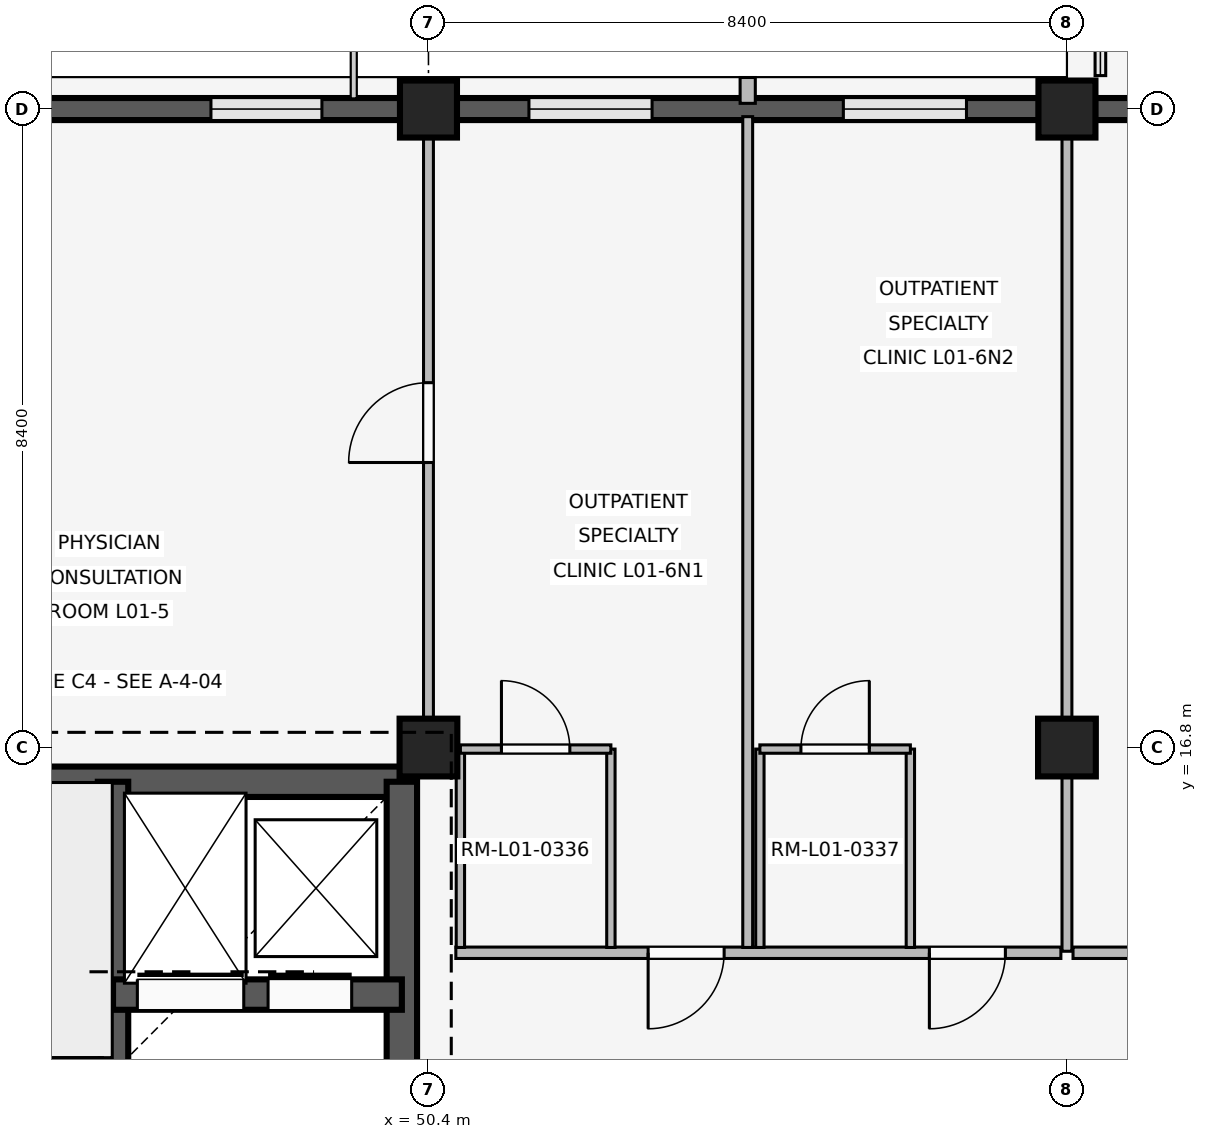
"""IFC4 building model, lengths in metres.
Left out: names, types, materials, properties, quantities, classifications, styles, units other than length and angle.
Written with IfcOpenShell. Run it as: python <this file> out.ifc"""

import sys

from ifc_helpers import new_model, si_unit, direction, frame, frame_2d, origin, origin_2d, place, context, subcontext, project, spatial, rectangle, extrude, element, fill, save


model = new_model("IFC4")
c1 = context("Model", 3, precision=1e-05, world=origin(), true_north=direction((0.0, 1.0)))
c2 = subcontext(c1, "Body", "Model", "MODEL_VIEW")
j1 = project(units=[si_unit("LENGTHUNIT", "METRE"), si_unit("PLANEANGLEUNIT", "RADIAN")], contexts=[c1])
p1 = place(None, origin())
s1 = spatial("IfcSite", under=j1, at=p1, CompositionType="ELEMENT")
p2 = place(p1, origin())
s2 = spatial("IfcBuilding", under=s1, at=p2, CompositionType="ELEMENT")
p3 = place(p2, frame((0.0, 0.0, 4.8)))
s3 = spatial("IfcBuildingStorey", under=s2, at=p3, CompositionType="ELEMENT", Elevation=4.8)
p4 = place(p3, frame((50.4, 16.8, 0.0), z_axis=(0.0, 0.0, 1.0), x_axis=(1.0, 0.0, 0.0)))
e1 = element("IfcColumn", 1, at=p4, inside=s3, PredefinedType="COLUMN", context=c2, shape_type="SweptSolid", body=[
    extrude(rectangle(XDim=0.76, YDim=0.76, at=origin_2d()), origin(), (0.0, 0.0, 1.0), 3.3),
])
p5 = place(p3, frame((50.4, 25.2, 0.0), z_axis=(0.0, 0.0, 1.0), x_axis=(1.0, 0.0, 0.0)))
e2 = element("IfcColumn", 2, at=p5, inside=s3, PredefinedType="COLUMN", context=c2, shape_type="SweptSolid", body=[
    extrude(rectangle(XDim=0.75, YDim=0.75, at=origin_2d()), origin(), (0.0, 0.0, 1.0), 3.3),
])
p6 = place(p3, frame((58.8, 16.8, 0.0), z_axis=(0.0, 0.0, 1.0), x_axis=(1.0, 0.0, 0.0)))
e3 = element("IfcColumn", 3, at=p6, inside=s3, PredefinedType="COLUMN", context=c2, shape_type="SweptSolid", body=[
    extrude(rectangle(XDim=0.76, YDim=0.76, at=origin_2d()), origin(), (0.0, 0.0, 1.0), 3.3),
])
p7 = place(p3, frame((58.8, 25.2, 0.0), z_axis=(0.0, 0.0, 1.0), x_axis=(1.0, 0.0, 0.0)))
e4 = element("IfcColumn", 4, at=p7, inside=s3, PredefinedType="COLUMN", context=c2, shape_type="SweptSolid", body=[
    extrude(rectangle(XDim=0.75, YDim=0.75, at=origin_2d()), origin(), (0.0, 0.0, 1.0), 3.3),
])
p8 = place(p3, frame((42.37, 25.2, 0.0), z_axis=(0.0, 0.0, 1.0), x_axis=(1.0, 0.0, 0.0)))
e5 = element("IfcWall", 5, at=p8, inside=s3, PredefinedType="SOLIDWALL", context=c2, shape_type="SweptSolid", body=[
    extrude(rectangle(XDim=7.66, YDim=0.29, at=frame_2d((3.83, 0.0))), origin(), (0.0, 0.0, 1.0), 2.42),
])
p9 = place(p8, frame((1.032, 0.0, 0.85)))
e6 = element("IfcOpeningElement", 6, at=p9, cuts=e5, PredefinedType="OPENING", context=c2, shape_type="SweptSolid", body=[
    extrude(rectangle(XDim=1.46, YDim=0.85, at=frame_2d((0.73, 0.425))), frame((0.0, 0.155, 0.0), z_axis=(0.0, -1.0, 0.0), x_axis=(1.0, 0.0, 0.0)), (0.0, 0.0, 1.0), 0.31),
])
p10 = place(p8, frame((5.168, 0.0, 0.85)))
e7 = element("IfcOpeningElement", 7, at=p10, cuts=e5, PredefinedType="OPENING", context=c2, shape_type="SweptSolid", body=[
    extrude(rectangle(XDim=1.46, YDim=0.85, at=frame_2d((0.73, 0.425))), frame((0.0, 0.155, 0.0), z_axis=(0.0, -1.0, 0.0), x_axis=(1.0, 0.0, 0.0)), (0.0, 0.0, 1.0), 0.31),
])
p11 = place(p3, frame((50.77, 25.2, 0.0), z_axis=(0.0, 0.0, 1.0), x_axis=(1.0, 0.0, 0.0)))
e8 = element("IfcWall", 8, at=p11, inside=s3, PredefinedType="SOLIDWALL", context=c2, shape_type="SweptSolid", body=[
    extrude(rectangle(XDim=7.66, YDim=0.29, at=frame_2d((3.83, 0.0))), origin(), (0.0, 0.0, 1.0), 2.42),
])
p12 = place(p11, frame((0.952, 0.0, 0.85)))
e9 = element("IfcOpeningElement", 9, at=p12, cuts=e8, PredefinedType="OPENING", context=c2, shape_type="SweptSolid", body=[
    extrude(rectangle(XDim=1.62, YDim=0.95, at=frame_2d((0.81, 0.475))), frame((0.0, 0.155, 0.0), z_axis=(0.0, -1.0, 0.0), x_axis=(1.0, 0.0, 0.0)), (0.0, 0.0, 1.0), 0.31),
])
p13 = place(p11, frame((5.088, 0.0, 0.85)))
e10 = element("IfcOpeningElement", 10, at=p13, cuts=e8, PredefinedType="OPENING", context=c2, shape_type="SweptSolid", body=[
    extrude(rectangle(XDim=1.62, YDim=0.95, at=frame_2d((0.81, 0.475))), frame((0.0, 0.155, 0.0), z_axis=(0.0, -1.0, 0.0), x_axis=(1.0, 0.0, 0.0)), (0.0, 0.0, 1.0), 0.31),
])
p14 = place(p3, frame((54.6, 25.275, 0.0), z_axis=(0.0, 0.0, 1.0), x_axis=(0.0, 1.0, 0.0)))
e11 = element("IfcWall", 11, at=p14, inside=s3, PredefinedType="ELEMENTEDWALL", context=c2, shape_type="SweptSolid", body=[
    extrude(rectangle(XDim=0.34, YDim=0.2, at=frame_2d((0.17, 0.0))), origin(), (0.0, 0.0, 1.0), 2.4),
])
p15 = place(p3, frame((59.17, 25.2, 0.0), z_axis=(0.0, 0.0, 1.0), x_axis=(1.0, 0.0, 0.0)))
e12 = element("IfcWall", 12, at=p15, inside=s3, PredefinedType="SOLIDWALL", context=c2, shape_type="SweptSolid", body=[
    extrude(rectangle(XDim=7.66, YDim=0.29, at=frame_2d((3.83, 0.0))), origin(), (0.0, 0.0, 1.0), 2.42),
])
p16 = place(p15, frame((2.88, 0.0, 0.0)))
e13 = element("IfcOpeningElement", 13, at=p16, cuts=e12, PredefinedType="OPENING", context=c2, shape_type="SweptSolid", body=[
    extrude(rectangle(XDim=1.9, YDim=2.3, at=frame_2d((0.95, 1.15))), frame((0.0, 0.155, 0.0), z_axis=(0.0, -1.0, 0.0), x_axis=(1.0, 0.0, 0.0)), (0.0, 0.0, 1.0), 0.31),
])
p17 = place(p3, frame((42.55, 16.35, 0.0), z_axis=(0.0, 0.0, 1.0), x_axis=(1.0, 0.0, 0.0)))
e14 = element("IfcWall", 14, at=p17, inside=s3, PredefinedType="SHEAR", context=c2, shape_type="SweptSolid", body=[
    extrude(rectangle(XDim=7.5, YDim=0.4, at=frame_2d((3.75, 0.0))), origin(), (0.0, 0.0, 1.0), 3.02),
])
p18 = place(p3, frame((50.05, 8.8, 0.0), z_axis=(0.0, 0.0, 1.0), x_axis=(0.0, 1.0, 0.0)))
e15 = element("IfcWall", 15, at=p18, inside=s3, PredefinedType="SHEAR", context=c2, shape_type="SweptSolid", body=[
    extrude(rectangle(XDim=7.55, YDim=0.4, at=frame_2d((3.775, 0.0))), origin(), (0.0, 0.0, 1.0), 3.02),
])
p19 = place(p18, frame((2.4, 0.0, 0.0)))
e16 = element("IfcOpeningElement", 16, at=p19, cuts=e15, PredefinedType="OPENING", context=c2, shape_type="SweptSolid", body=[
    extrude(rectangle(XDim=1.2, YDim=2.2, at=frame_2d((0.6, 1.1))), frame((0.0, 0.21, 0.0), z_axis=(0.0, -1.0, 0.0), x_axis=(1.0, 0.0, 0.0)), (0.0, 0.0, 1.0), 0.42),
])
p20 = place(p3, frame((46.25, 8.8, 0.0), z_axis=(0.0, 0.0, 1.0), x_axis=(0.0, 1.0, 0.0)))
e17 = element("IfcWall", 17, at=p20, inside=s3, PredefinedType="SHEAR", context=c2, shape_type="SweptSolid", body=[
    extrude(rectangle(XDim=7.55, YDim=0.4, at=frame_2d((3.775, 0.0))), origin(), (0.0, 0.0, 1.0), 3.02),
])
p21 = place(p20, frame((0.28, 0.0, 0.0)))
e18 = element("IfcOpeningElement", 18, at=p21, cuts=e17, PredefinedType="OPENING", context=c2, shape_type="SweptSolid", body=[
    extrude(rectangle(XDim=1.0, YDim=2.15, at=frame_2d((0.5, 1.075))), frame((0.0, 0.21, 0.0), z_axis=(0.0, -1.0, 0.0), x_axis=(1.0, 0.0, 0.0)), (0.0, 0.0, 1.0), 0.42),
])
p22 = place(p3, frame((46.25, 13.55, 0.0), z_axis=(0.0, 0.0, 1.0), x_axis=(1.0, 0.0, 0.0)))
e19 = element("IfcWall", 19, at=p22, inside=s3, PredefinedType="SHEAR", context=c2, shape_type="SweptSolid", body=[
    extrude(rectangle(XDim=3.8, YDim=0.4, at=frame_2d((1.9, 0.0))), origin(), (0.0, 0.0, 1.0), 3.02),
])
p23 = place(p22, frame((0.32, 0.0, 0.0)))
e20 = element("IfcOpeningElement", 20, at=p23, cuts=e19, PredefinedType="OPENING", context=c2, shape_type="SweptSolid", body=[
    extrude(rectangle(XDim=1.4, YDim=2.25, at=frame_2d((0.7, 1.125))), frame((0.0, 0.21, 0.0), z_axis=(0.0, -1.0, 0.0), x_axis=(1.0, 0.0, 0.0)), (0.0, 0.0, 1.0), 0.42),
])
p24 = place(p22, frame((2.04, 0.0, 0.0)))
e21 = element("IfcOpeningElement", 21, at=p24, cuts=e19, PredefinedType="OPENING", context=c2, shape_type="SweptSolid", body=[
    extrude(rectangle(XDim=1.1, YDim=2.15, at=frame_2d((0.55, 1.075))), frame((0.0, 0.21, 0.0), z_axis=(0.0, -1.0, 0.0), x_axis=(1.0, 0.0, 0.0)), (0.0, 0.0, 1.0), 0.42),
])
p25 = place(p3, frame((50.4, 17.15, 0.0), z_axis=(0.0, 0.0, 1.0), x_axis=(0.0, 1.0, 0.0)))
e22 = element("IfcWall", 22, at=p25, inside=s3, PredefinedType="PARTITIONING", context=c2, shape_type="SweptSolid", body=[
    extrude(rectangle(XDim=7.91, YDim=0.13, at=frame_2d((3.955, 0.0))), origin(), (0.0, 0.0, 1.0), 2.4),
])
p26 = place(p25, frame((3.4, 0.0, 0.0)))
e23 = element("IfcOpeningElement", 23, at=p26, cuts=e22, PredefinedType="OPENING", context=c2, shape_type="SweptSolid", body=[
    extrude(rectangle(XDim=1.05, YDim=2.2, at=frame_2d((0.525, 1.1))), frame((0.0, 0.075, 0.0), z_axis=(0.0, -1.0, 0.0), x_axis=(1.0, 0.0, 0.0)), (0.0, 0.0, 1.0), 0.15),
])
p27 = place(p3, frame((58.72, 14.1, 0.0), z_axis=(0.0, 0.0, 1.0), x_axis=(-1.0, 0.0, 0.0)))
e24 = element("IfcWall", 24, at=p27, inside=s3, PredefinedType="PARTITIONING", context=c2, shape_type="SweptSolid", body=[
    extrude(rectangle(XDim=7.96, YDim=0.15, at=frame_2d((3.98, 0.0))), origin(), (0.0, 0.0, 1.0), 2.4),
])
p28 = place(p27, frame((0.73, 0.0, 0.0)))
e25 = element("IfcOpeningElement", 25, at=p28, cuts=e24, PredefinedType="OPENING", context=c2, shape_type="SweptSolid", body=[
    extrude(rectangle(XDim=1.0, YDim=2.15, at=frame_2d((0.5, 1.075))), frame((0.0, 0.085, 0.0), z_axis=(0.0, -1.0, 0.0), x_axis=(1.0, 0.0, 0.0)), (0.0, 0.0, 1.0), 0.17),
])
p29 = place(p27, frame((4.43, 0.0, 0.0)))
e26 = element("IfcOpeningElement", 26, at=p29, cuts=e24, PredefinedType="OPENING", context=c2, shape_type="SweptSolid", body=[
    extrude(rectangle(XDim=1.0, YDim=2.15, at=frame_2d((0.5, 1.075))), frame((0.0, 0.085, 0.0), z_axis=(0.0, -1.0, 0.0), x_axis=(1.0, 0.0, 0.0)), (0.0, 0.0, 1.0), 0.17),
])
p30 = place(p3, frame((54.6, 14.17, 0.0), z_axis=(0.0, 0.0, 1.0), x_axis=(0.0, 1.0, 0.0)))
e27 = element("IfcWall", 27, at=p30, inside=s3, PredefinedType="PARTITIONING", context=c2, shape_type="SweptSolid", body=[
    extrude(rectangle(XDim=10.93, YDim=0.13, at=frame_2d((5.465, 0.0))), origin(), (0.0, 0.0, 1.0), 2.4),
])
for number, where, z_axis, x_axis in (
    (28, (50.82, 14.17, 0.0), (0.0, 0.0, 1.0), (0.0, 1.0, 0.0)),
    (29, (52.8, 14.17, 0.0), (0.0, 0.0, 1.0), (0.0, 1.0, 0.0)),
):
    element("IfcWall", number, at=place(p3, frame(where, z_axis=z_axis, x_axis=x_axis)), inside=s3, PredefinedType="PARTITIONING", context=c2, shape_type="SweptSolid", body=[
        extrude(rectangle(XDim=2.61, YDim=0.11, at=frame_2d((1.305, 0.0))), origin(), (0.0, 0.0, 1.0), 2.4),
    ])
p31 = place(p3, frame((50.82, 16.78, 0.0), z_axis=(0.0, 0.0, 1.0), x_axis=(1.0, 0.0, 0.0)))
e30 = element("IfcWall", 30, at=p31, inside=s3, PredefinedType="PARTITIONING", context=c2, shape_type="SweptSolid", body=[
    extrude(rectangle(XDim=1.98, YDim=0.11, at=frame_2d((0.99, 0.0))), origin(), (0.0, 0.0, 1.0), 2.4),
])
p32 = place(p31, frame((0.54, 0.0, 0.0)))
e31 = element("IfcOpeningElement", 31, at=p32, cuts=e30, PredefinedType="OPENING", context=c2, shape_type="SweptSolid", body=[
    extrude(rectangle(XDim=0.9, YDim=2.1, at=frame_2d((0.45, 1.05))), frame((0.0, 0.065, 0.0), z_axis=(0.0, -1.0, 0.0), x_axis=(1.0, 0.0, 0.0)), (0.0, 0.0, 1.0), 0.13),
])
for number, where, z_axis, x_axis in (
    (32, (54.76, 14.17, 0.0), (0.0, 0.0, 1.0), (0.0, 1.0, 0.0)),
    (33, (56.74, 14.17, 0.0), (0.0, 0.0, 1.0), (0.0, 1.0, 0.0)),
):
    element("IfcWall", number, at=place(p3, frame(where, z_axis=z_axis, x_axis=x_axis)), inside=s3, PredefinedType="PARTITIONING", context=c2, shape_type="SweptSolid", body=[
        extrude(rectangle(XDim=2.61, YDim=0.11, at=frame_2d((1.305, 0.0))), origin(), (0.0, 0.0, 1.0), 2.4),
    ])
p33 = place(p3, frame((54.76, 16.78, 0.0), z_axis=(0.0, 0.0, 1.0), x_axis=(1.0, 0.0, 0.0)))
e34 = element("IfcWall", 34, at=p33, inside=s3, PredefinedType="PARTITIONING", context=c2, shape_type="SweptSolid", body=[
    extrude(rectangle(XDim=1.98, YDim=0.11, at=frame_2d((0.99, 0.0))), origin(), (0.0, 0.0, 1.0), 2.4),
])
p34 = place(p33, frame((0.54, 0.0, 0.0)))
e35 = element("IfcOpeningElement", 35, at=p34, cuts=e34, PredefinedType="OPENING", context=c2, shape_type="SweptSolid", body=[
    extrude(rectangle(XDim=0.9, YDim=2.1, at=frame_2d((0.45, 1.05))), frame((0.0, 0.065, 0.0), z_axis=(0.0, -1.0, 0.0), x_axis=(1.0, 0.0, 0.0)), (0.0, 0.0, 1.0), 0.13),
])
p35 = place(p3, frame((58.8, 14.12, 0.0), z_axis=(0.0, 0.0, 1.0), x_axis=(0.0, 1.0, 0.0)))
e36 = element("IfcWall", 36, at=p35, inside=s3, PredefinedType="PARTITIONING", context=c2, shape_type="SweptSolid", body=[
    extrude(rectangle(XDim=10.94, YDim=0.13, at=frame_2d((5.47, 0.0))), origin(), (0.0, 0.0, 1.0), 2.4),
])
p36 = place(p3, frame((67.12, 14.1, 0.0), z_axis=(0.0, 0.0, 1.0), x_axis=(-1.0, 0.0, 0.0)))
e37 = element("IfcWall", 37, at=p36, inside=s3, PredefinedType="PARTITIONING", context=c2, shape_type="SweptSolid", body=[
    extrude(rectangle(XDim=8.24, YDim=0.15, at=frame_2d((4.12, 0.0))), origin(), (0.0, 0.0, 1.0), 2.4),
])
p37 = place(p36, frame((1.15, 0.0, 0.0)))
e38 = element("IfcOpeningElement", 38, at=p37, cuts=e37, PredefinedType="OPENING", context=c2, shape_type="SweptSolid", body=[
    extrude(rectangle(XDim=1.9, YDim=2.3, at=frame_2d((0.95, 1.15))), frame((0.0, 0.085, 0.0), z_axis=(0.0, -1.0, 0.0), x_axis=(1.0, 0.0, 0.0)), (0.0, 0.0, 1.0), 0.17),
])
p38 = place(p10, origin())
e39 = element("IfcWindow", 39, at=p38, inside=s3, PartitioningType="SINGLE_PANEL", PredefinedType="WINDOW", context=c2, shape_type="SweptSolid", body=[
    extrude(rectangle(XDim=1.46, YDim=0.85, at=frame_2d((0.73, 0.425))), frame((0.0, 0.03, 0.0), z_axis=(0.0, -1.0, 0.0), x_axis=(1.0, 0.0, 0.0)), (0.0, 0.0, 1.0), 0.06),
])
fill(e7, e39)
p39 = place(p12, origin())
e40 = element("IfcWindow", 40, at=p39, inside=s3, PartitioningType="SINGLE_PANEL", PredefinedType="WINDOW", context=c2, shape_type="SweptSolid", body=[
    extrude(rectangle(XDim=1.62, YDim=0.95, at=frame_2d((0.81, 0.475))), frame((0.0, 0.03, 0.0), z_axis=(0.0, -1.0, 0.0), x_axis=(1.0, 0.0, 0.0)), (0.0, 0.0, 1.0), 0.06),
])
fill(e9, e40)
p40 = place(p13, origin())
e41 = element("IfcWindow", 41, at=p40, inside=s3, PartitioningType="SINGLE_PANEL", PredefinedType="WINDOW", context=c2, shape_type="SweptSolid", body=[
    extrude(rectangle(XDim=1.62, YDim=0.95, at=frame_2d((0.81, 0.475))), frame((0.0, 0.03, 0.0), z_axis=(0.0, -1.0, 0.0), x_axis=(1.0, 0.0, 0.0)), (0.0, 0.0, 1.0), 0.06),
])
fill(e10, e41)
p41 = place(p23, origin())
e42 = element("IfcDoor", 42, at=p41, inside=s3, OperationType="SLIDING_TO_LEFT", PredefinedType="DOOR", context=c2, shape_type="SweptSolid", body=[
    extrude(rectangle(XDim=1.4, YDim=2.25, at=frame_2d((0.7, 1.125))), frame((0.0, 0.025, 0.0), z_axis=(0.0, -1.0, 0.0), x_axis=(1.0, 0.0, 0.0)), (0.0, 0.0, 1.0), 0.05),
])
fill(e20, e42)
p42 = place(p24, origin())
e43 = element("IfcDoor", 43, at=p42, inside=s3, OperationType="SLIDING_TO_LEFT", PredefinedType="DOOR", context=c2, shape_type="SweptSolid", body=[
    extrude(rectangle(XDim=1.1, YDim=2.15, at=frame_2d((0.55, 1.075))), frame((0.0, 0.025, 0.0), z_axis=(0.0, -1.0, 0.0), x_axis=(1.0, 0.0, 0.0)), (0.0, 0.0, 1.0), 0.05),
])
fill(e21, e43)
p43 = place(p26, origin())
e44 = element("IfcDoor", 44, at=p43, inside=s3, OperationType="SINGLE_SWING_LEFT", PredefinedType="DOOR", context=c2, shape_type="SweptSolid", body=[
    extrude(rectangle(XDim=1.05, YDim=2.2, at=frame_2d((0.525, 1.1))), frame((0.0, 0.025, 0.0), z_axis=(0.0, -1.0, 0.0), x_axis=(1.0, 0.0, 0.0)), (0.0, 0.0, 1.0), 0.05),
])
fill(e23, e44)
p44 = place(p28, origin())
e45 = element("IfcDoor", 45, at=p44, inside=s3, OperationType="SINGLE_SWING_RIGHT", PredefinedType="DOOR", context=c2, shape_type="SweptSolid", body=[
    extrude(rectangle(XDim=1.0, YDim=2.15, at=frame_2d((0.5, 1.075))), frame((0.0, 0.025, 0.0), z_axis=(0.0, -1.0, 0.0), x_axis=(1.0, 0.0, 0.0)), (0.0, 0.0, 1.0), 0.05),
])
fill(e25, e45)
p45 = place(p29, origin())
e46 = element("IfcDoor", 46, at=p45, inside=s3, OperationType="SINGLE_SWING_RIGHT", PredefinedType="DOOR", context=c2, shape_type="SweptSolid", body=[
    extrude(rectangle(XDim=1.0, YDim=2.15, at=frame_2d((0.5, 1.075))), frame((0.0, 0.025, 0.0), z_axis=(0.0, -1.0, 0.0), x_axis=(1.0, 0.0, 0.0)), (0.0, 0.0, 1.0), 0.05),
])
fill(e26, e46)
p46 = place(p32, origin())
e47 = element("IfcDoor", 47, at=p46, inside=s3, OperationType="SINGLE_SWING_LEFT", PredefinedType="DOOR", context=c2, shape_type="SweptSolid", body=[
    extrude(rectangle(XDim=0.9, YDim=2.1, at=frame_2d((0.45, 1.05))), frame((0.0, 0.025, 0.0), z_axis=(0.0, -1.0, 0.0), x_axis=(1.0, 0.0, 0.0)), (0.0, 0.0, 1.0), 0.05),
])
fill(e31, e47)
p47 = place(p34, origin())
e48 = element("IfcDoor", 48, at=p47, inside=s3, OperationType="SINGLE_SWING_RIGHT", PredefinedType="DOOR", context=c2, shape_type="SweptSolid", body=[
    extrude(rectangle(XDim=0.9, YDim=2.1, at=frame_2d((0.45, 1.05))), frame((0.0, 0.025, 0.0), z_axis=(0.0, -1.0, 0.0), x_axis=(1.0, 0.0, 0.0)), (0.0, 0.0, 1.0), 0.05),
])
fill(e35, e48)
save(model, sys.argv[1])
